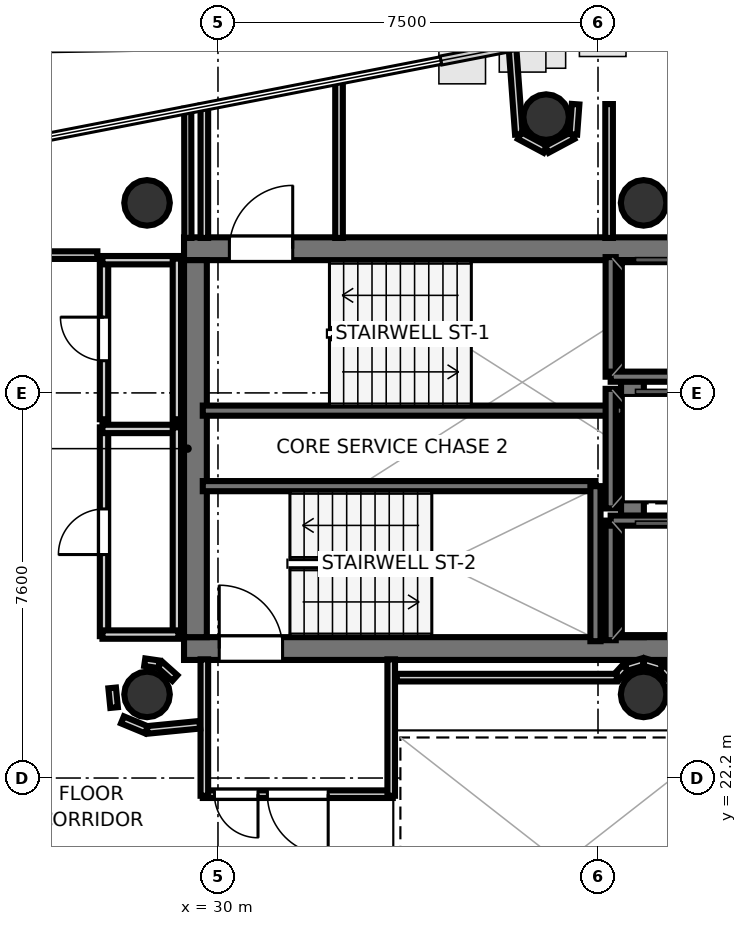
"""IFC4 building model, lengths in metres.
Left out: names, types, materials, properties, quantities, classifications, styles, units other than length and angle.
Written with IfcOpenShell. Run it as: python <this file> out.ifc"""

import sys

from ifc_helpers import new_model, si_unit, direction, frame, frame_2d, origin, origin_2d, place, context, subcontext, project, spatial, rectangle, hollow_circle, extrude, element, fill, save


model = new_model("IFC4")
c1 = context("Model", 3, precision=1e-05, world=origin(), true_north=direction((0.0, 1.0)))
c2 = subcontext(c1, "Body", "Model", "MODEL_VIEW")
j1 = project(units=[si_unit("LENGTHUNIT", "METRE"), si_unit("PLANEANGLEUNIT", "RADIAN")], contexts=[c1])
p1 = place(None, origin())
s1 = spatial("IfcSite", under=j1, at=p1, CompositionType="ELEMENT")
p2 = place(p1, origin())
s2 = spatial("IfcBuilding", under=s1, at=p2, CompositionType="ELEMENT")
p3 = place(p2, frame((0.0, 0.0, 299.1)))
s3 = spatial("IfcBuildingStorey", under=s2, at=p3, CompositionType="ELEMENT", Elevation=299.1)
p4 = place(p3, frame((29.33, 32.645, 0.0), z_axis=(0.0, 0.0, 1.0), x_axis=(1.0, 0.0, 0.0)))
e1 = element("IfcWall", 1, at=p4, inside=s3, PredefinedType="SHEAR", context=c2, shape_type="SweptSolid", body=[
    extrude(rectangle(XDim=10.52, YDim=0.45, at=frame_2d((5.26, 0.0))), origin(), (0.0, 0.0, 1.0), 3.52),
])
p5 = place(p4, frame((0.895, 0.0, 0.0)))
e2 = element("IfcOpeningElement", 2, at=p5, cuts=e1, PredefinedType="OPENING", context=c2, shape_type="SweptSolid", body=[
    extrude(rectangle(XDim=1.25, YDim=2.15, at=frame_2d((0.625, 1.075))), frame((0.0, 0.235, 0.0), z_axis=(0.0, -1.0, 0.0), x_axis=(1.0, 0.0, 0.0)), (0.0, 0.0, 1.0), 0.47),
])
p6 = place(p3, frame((29.33, 24.755, 0.0), z_axis=(0.0, 0.0, 1.0), x_axis=(1.0, 0.0, 0.0)))
e3 = element("IfcWall", 3, at=p6, inside=s3, PredefinedType="SHEAR", context=c2, shape_type="SweptSolid", body=[
    extrude(rectangle(XDim=10.52, YDim=0.45, at=frame_2d((5.26, 0.0))), origin(), (0.0, 0.0, 1.0), 3.52),
])
p7 = place(p6, frame((0.695, 0.0, 0.0)))
e4 = element("IfcOpeningElement", 4, at=p7, cuts=e3, PredefinedType="OPENING", context=c2, shape_type="SweptSolid", body=[
    extrude(rectangle(XDim=1.25, YDim=2.15, at=frame_2d((0.625, 1.075))), frame((0.0, 0.235, 0.0), z_axis=(0.0, -1.0, 0.0), x_axis=(1.0, 0.0, 0.0)), (0.0, 0.0, 1.0), 0.47),
])
for number, where, z_axis, x_axis in (
    (5, (29.555, 24.98, 0.0), (0.0, 0.0, 1.0), (0.0, 1.0, 0.0)),
    (6, (38.18, 24.98, 0.0), (0.0, 0.0, 1.0), (0.0, 1.0, 0.0)),
):
    element("IfcWall", number, at=place(p3, frame(where, z_axis=z_axis, x_axis=x_axis)), inside=s3, PredefinedType="SHEAR", context=c2, shape_type="SweptSolid", body=[
        extrude(rectangle(XDim=7.44, YDim=0.45, at=frame_2d((3.72, 0.0))), origin(), (0.0, 0.0, 1.0), 3.52),
    ])
for number, where, z_axis, x_axis in (
    (7, (28.6, 33.55, 0.0), (0.0, 0.0, 1.0), (1.0, 0.0, 0.0)),
    (8, (28.6, 23.85, 0.0), (0.0, 0.0, 1.0), (1.0, 0.0, 0.0)),
    (9, (38.4, 33.55, 0.0), (0.0, 0.0, 1.0), (1.0, 0.0, 0.0)),
    (10, (38.4, 23.85, 0.0), (0.0, 0.0, 1.0), (1.0, 0.0, 0.0)),
    (11, (36.476, 35.243, 0.0), (0.0, 0.0, 1.0), (1.0, 0.0, 0.0)),
):
    element("IfcColumn", number, at=place(p3, frame(where, z_axis=z_axis, x_axis=x_axis)), inside=s3, PredefinedType="COLUMN", context=c2, shape_type="SweptSolid", body=[
        extrude(hollow_circle(Radius=0.45, WallThickness=0.025, at=origin_2d()), origin(), (0.0, 0.0, 1.0), 3.7),
    ])
p8 = place(p3, frame((29.7, 29.45, 0.0), z_axis=(0.0, 0.0, 1.0), x_axis=(1.0, 0.0, 0.0)))
e12 = element("IfcWall", 12, at=p8, inside=s3, PredefinedType="SOLIDWALL", context=c2, shape_type="SweptSolid", body=[
    extrude(rectangle(XDim=8.3, YDim=0.2, at=frame_2d((4.15, 0.0))), origin(), (0.0, 0.0, 1.0), 3.52),
])
p9 = place(p3, frame((29.7, 27.96, 0.0), z_axis=(0.0, 0.0, 1.0), x_axis=(1.0, 0.0, 0.0)))
e13 = element("IfcWall", 13, at=p9, inside=s3, PredefinedType="SOLIDWALL", context=c2, shape_type="SweptSolid", body=[
    extrude(rectangle(XDim=7.75, YDim=0.2, at=frame_2d((3.875, 0.0))), origin(), (0.0, 0.0, 1.0), 3.52),
])
p10 = place(p3, frame((37.45, 24.9, 0.0), z_axis=(0.0, 0.0, 1.0), x_axis=(0.0, 1.0, 0.0)))
e14 = element("IfcWall", 14, at=p10, inside=s3, PredefinedType="SOLIDWALL", context=c2, shape_type="SweptSolid", body=[
    extrude(rectangle(XDim=3.06, YDim=0.2, at=frame_2d((1.53, 0.0))), origin(), (0.0, 0.0, 1.0), 3.52),
])
p11 = place(p3, frame((37.75, 30.12, 0.0), z_axis=(0.0, 0.0, 1.0), x_axis=(0.0, 1.0, 0.0)))
e15 = element("IfcWall", 15, at=p11, inside=s3, PredefinedType="SOLIDWALL", context=c2, shape_type="SweptSolid", body=[
    extrude(rectangle(XDim=2.36, YDim=0.2, at=frame_2d((1.18, 0.0))), origin(), (0.0, 0.0, 1.0), 3.52),
])
p12 = place(p3, frame((37.75, 30.12, 0.0), z_axis=(0.0, 0.0, 1.0), x_axis=(1.0, 0.0, 0.0)))
e16 = element("IfcWall", 16, at=p12, inside=s3, PredefinedType="SOLIDWALL", context=c2, shape_type="SweptSolid", body=[
    extrude(rectangle(XDim=2.1, YDim=0.2, at=frame_2d((1.05, 0.0))), origin(), (0.0, 0.0, 1.0), 3.52),
])
p13 = place(p3, frame((37.75, 24.92, 0.0), z_axis=(0.0, 0.0, 1.0), x_axis=(0.0, 1.0, 0.0)))
e17 = element("IfcWall", 17, at=p13, inside=s3, PredefinedType="SOLIDWALL", context=c2, shape_type="SweptSolid", body=[
    extrude(rectangle(XDim=2.36, YDim=0.2, at=frame_2d((1.18, 0.0))), origin(), (0.0, 0.0, 1.0), 3.52),
])
p14 = place(p3, frame((37.75, 27.28, 0.0), z_axis=(0.0, 0.0, 1.0), x_axis=(1.0, 0.0, 0.0)))
e18 = element("IfcWall", 18, at=p14, inside=s3, PredefinedType="SOLIDWALL", context=c2, shape_type="SweptSolid", body=[
    extrude(rectangle(XDim=2.1, YDim=0.2, at=frame_2d((1.05, 0.0))), origin(), (0.0, 0.0, 1.0), 3.52),
])
p15 = place(p3, frame((37.75, 27.52, 0.0), z_axis=(0.0, 0.0, 1.0), x_axis=(0.0, 1.0, 0.0)))
e19 = element("IfcWall", 19, at=p15, inside=s3, PredefinedType="SOLIDWALL", context=c2, shape_type="SweptSolid", body=[
    extrude(rectangle(XDim=2.36, YDim=0.2, at=frame_2d((1.18, 0.0))), origin(), (0.0, 0.0, 1.0), 3.52),
])
p16 = place(p3, frame((29.731, 32.858, 0.0), z_axis=(0.0, 0.0, 1.0), x_axis=(0.0, 1.0, 0.0)))
e20 = element("IfcWall", 20, at=p16, inside=s3, PredefinedType="PARTITIONING", context=c2, shape_type="SweptSolid", body=[
    extrude(rectangle(XDim=2.613, YDim=0.15, at=frame_2d((1.307, 0.0))), origin(), (0.0, 0.0, 1.0), 2.84),
])
p17 = place(p3, frame((32.389, 35.988, 0.0), z_axis=(0.0, 0.0, 1.0), x_axis=(0.0, -1.0, 0.0)))
e21 = element("IfcWall", 21, at=p17, inside=s3, PredefinedType="PARTITIONING", context=c2, shape_type="SweptSolid", body=[
    extrude(rectangle(XDim=3.13, YDim=0.15, at=frame_2d((1.565, 0.0))), origin(), (0.0, 0.0, 1.0), 2.84),
])
p18 = place(p3, frame((33.45, 21.881, 0.0), z_axis=(0.0, 0.0, 1.0), x_axis=(-1.0, 0.0, 0.0)))
e22 = element("IfcWall", 22, at=p18, inside=s3, PredefinedType="PARTITIONING", context=c2, shape_type="SweptSolid", body=[
    extrude(rectangle(XDim=3.75, YDim=0.15, at=frame_2d((1.875, 0.0))), origin(), (0.0, 0.0, 1.0), 2.84),
])
p19 = place(p18, frame((1.275, 0.0, 0.0)))
e23 = element("IfcOpeningElement", 23, at=p19, cuts=e22, PredefinedType="OPENING", context=c2, shape_type="SweptSolid", body=[
    extrude(rectangle(XDim=1.2, YDim=2.15, at=frame_2d((0.6, 1.075))), frame((0.0, 0.085, 0.0), z_axis=(0.0, -1.0, 0.0), x_axis=(1.0, 0.0, 0.0)), (0.0, 0.0, 1.0), 0.17),
])
p20 = place(p18, frame((2.66, 0.0, 0.0)))
e24 = element("IfcOpeningElement", 24, at=p20, cuts=e22, PredefinedType="OPENING", context=c2, shape_type="SweptSolid", body=[
    extrude(rectangle(XDim=0.86, YDim=2.05, at=frame_2d((0.43, 1.025))), frame((0.0, 0.085, 0.0), z_axis=(0.0, -1.0, 0.0), x_axis=(1.0, 0.0, 0.0)), (0.0, 0.0, 1.0), 0.17),
])
for number, where, z_axis, x_axis in (
    (25, (29.731, 21.85, 0.0), (0.0, 0.0, 1.0), (0.0, 1.0, 0.0)),
    (26, (33.419, 24.542, 0.0), (0.0, 0.0, 1.0), (0.0, -1.0, 0.0)),
):
    element("IfcWall", number, at=place(p3, frame(where, z_axis=z_axis, x_axis=x_axis)), inside=s3, PredefinedType="PARTITIONING", context=c2, shape_type="SweptSolid", body=[
        extrude(rectangle(XDim=2.692, YDim=0.15, at=frame_2d((1.346, 0.0))), origin(), (0.0, 0.0, 1.0), 2.84),
    ])
p21 = place(p3, frame((27.751, 25.0, 0.0), z_axis=(0.0, 0.0, 1.0), x_axis=(0.0, 1.0, 0.0)))
e27 = element("IfcWall", 27, at=p21, inside=s3, PredefinedType="PLUMBINGWALL", context=c2, shape_type="SweptSolid", body=[
    extrude(rectangle(XDim=4.12, YDim=0.165, at=frame_2d((2.06, 0.0))), origin(), (0.0, 0.0, 1.0), 2.84),
])
p22 = place(p21, frame((1.61, 0.0, 0.0)))
e28 = element("IfcOpeningElement", 28, at=p22, cuts=e27, PredefinedType="OPENING", context=c2, shape_type="SweptSolid", body=[
    extrude(rectangle(XDim=0.9, YDim=2.1, at=frame_2d((0.45, 1.05))), frame((0.0, 0.093, 0.0), z_axis=(0.0, -1.0, 0.0), x_axis=(1.0, 0.0, 0.0)), (0.0, 0.0, 1.0), 0.185),
])
p23 = place(p3, frame((27.72, 29.089, 0.0), z_axis=(0.0, 0.0, 1.0), x_axis=(1.0, 0.0, 0.0)))
e29 = element("IfcWall", 29, at=p23, inside=s3, PredefinedType="PLUMBINGWALL", context=c2, shape_type="SweptSolid", body=[
    extrude(rectangle(XDim=1.5, YDim=0.165, at=frame_2d((0.75, 0.0))), origin(), (0.0, 0.0, 1.0), 2.84),
])
p24 = place(p3, frame((29.189, 29.12, 0.0), z_axis=(0.0, 0.0, 1.0), x_axis=(0.0, -1.0, 0.0)))
e30 = element("IfcWall", 30, at=p24, inside=s3, PredefinedType="PLUMBINGWALL", context=c2, shape_type="SweptSolid", body=[
    extrude(rectangle(XDim=4.12, YDim=0.165, at=frame_2d((2.06, 0.0))), origin(), (0.0, 0.0, 1.0), 2.84),
])
p25 = place(p3, frame((29.22, 25.031, 0.0), z_axis=(0.0, 0.0, 1.0), x_axis=(-1.0, 0.0, 0.0)))
e31 = element("IfcWall", 31, at=p25, inside=s3, PredefinedType="PLUMBINGWALL", context=c2, shape_type="SweptSolid", body=[
    extrude(rectangle(XDim=1.5, YDim=0.165, at=frame_2d((0.75, 0.0))), origin(), (0.0, 0.0, 1.0), 2.84),
])
p26 = place(p3, frame((27.751, 29.28, 0.0), z_axis=(0.0, 0.0, 1.0), x_axis=(0.0, 1.0, 0.0)))
e32 = element("IfcWall", 32, at=p26, inside=s3, PredefinedType="PLUMBINGWALL", context=c2, shape_type="SweptSolid", body=[
    extrude(rectangle(XDim=3.17, YDim=0.165, at=frame_2d((1.585, 0.0))), origin(), (0.0, 0.0, 1.0), 2.84),
])
p27 = place(p26, frame((1.155, 0.0, 0.0)))
e33 = element("IfcOpeningElement", 33, at=p27, cuts=e32, PredefinedType="OPENING", context=c2, shape_type="SweptSolid", body=[
    extrude(rectangle(XDim=0.86, YDim=2.05, at=frame_2d((0.43, 1.025))), frame((0.0, 0.093, 0.0), z_axis=(0.0, -1.0, 0.0), x_axis=(1.0, 0.0, 0.0)), (0.0, 0.0, 1.0), 0.185),
])
p28 = place(p3, frame((27.72, 32.419, 0.0), z_axis=(0.0, 0.0, 1.0), x_axis=(1.0, 0.0, 0.0)))
e34 = element("IfcWall", 34, at=p28, inside=s3, PredefinedType="PLUMBINGWALL", context=c2, shape_type="SweptSolid", body=[
    extrude(rectangle(XDim=1.5, YDim=0.165, at=frame_2d((0.75, 0.0))), origin(), (0.0, 0.0, 1.0), 2.84),
])
p29 = place(p3, frame((29.189, 32.45, 0.0), z_axis=(0.0, 0.0, 1.0), x_axis=(0.0, -1.0, 0.0)))
e35 = element("IfcWall", 35, at=p29, inside=s3, PredefinedType="PLUMBINGWALL", context=c2, shape_type="SweptSolid", body=[
    extrude(rectangle(XDim=3.17, YDim=0.165, at=frame_2d((1.585, 0.0))), origin(), (0.0, 0.0, 1.0), 2.84),
])
p30 = place(p3, frame((38.951, 24.171, 0.0), z_axis=(0.0, 0.0, 1.0), x_axis=(-0.674186852077, 0.738560822469, 0.0)))
e36 = element("IfcWall", 36, at=p30, inside=s3, PredefinedType="PARTITIONING", context=c2, shape_type="SweptSolid", body=[
    extrude(rectangle(XDim=0.281, YDim=0.15, at=frame_2d((0.14, 0.0))), origin(), (0.0, 0.0, 1.0), 2.84),
])
p31 = place(p3, frame((38.748, 24.387, 0.0), z_axis=(0.0, 0.0, 1.0), x_axis=(-0.956948991291, 0.290256142171, 0.0)))
e37 = element("IfcWall", 37, at=p31, inside=s3, PredefinedType="PARTITIONING", context=c2, shape_type="SweptSolid", body=[
    extrude(rectangle(XDim=0.354, YDim=0.15, at=frame_2d((0.177, 0.0))), origin(), (0.0, 0.0, 1.0), 2.84),
])
p32 = place(p3, frame((38.391, 24.49, 0.0), z_axis=(0.0, 0.0, 1.0), x_axis=(-0.957007018611, -0.290064762301, 0.0)))
e38 = element("IfcWall", 38, at=p32, inside=s3, PredefinedType="PARTITIONING", context=c2, shape_type="SweptSolid", body=[
    extrude(rectangle(XDim=0.354, YDim=0.15, at=frame_2d((0.177, 0.0))), origin(), (0.0, 0.0, 1.0), 2.84),
])
p33 = place(p3, frame((38.038, 24.378, 0.0), z_axis=(0.0, 0.0, 1.0), x_axis=(-0.673658387955, -0.739042878551, 0.0)))
e39 = element("IfcWall", 39, at=p33, inside=s3, PredefinedType="PARTITIONING", context=c2, shape_type="SweptSolid", body=[
    extrude(rectangle(XDim=0.246, YDim=0.15, at=frame_2d((0.123, 0.0))), origin(), (0.0, 0.0, 1.0), 2.84),
])
p34 = place(p3, frame((37.872, 24.181, 0.0), z_axis=(0.0, 0.0, 1.0), x_axis=(-1.0, 0.0, 0.0)))
e40 = element("IfcWall", 40, at=p34, inside=s3, PredefinedType="PARTITIONING", context=c2, shape_type="SweptSolid", body=[
    extrude(rectangle(XDim=4.342, YDim=0.15, at=frame_2d((2.171, 0.0))), origin(), (0.0, 0.0, 1.0), 2.84),
])
p35 = place(p3, frame((29.149, 24.173, 0.0), z_axis=(0.0, 0.0, 1.0), x_axis=(-0.745225165416, 0.666812906917, 0.0)))
e41 = element("IfcWall", 41, at=p35, inside=s3, PredefinedType="PARTITIONING", context=c2, shape_type="SweptSolid", body=[
    extrude(rectangle(XDim=0.396, YDim=0.15, at=frame_2d((0.198, 0.0))), origin(), (0.0, 0.0, 1.0), 2.84),
])
p36 = place(p3, frame((28.838, 24.444, 0.0), z_axis=(0.0, 0.0, 1.0), x_axis=(-0.989449148305, 0.144880581578, 0.0)))
e42 = element("IfcWall", 42, at=p36, inside=s3, PredefinedType="PARTITIONING", context=c2, shape_type="SweptSolid", body=[
    extrude(rectangle(XDim=0.286, YDim=0.15, at=frame_2d((0.143, 0.0))), origin(), (0.0, 0.0, 1.0), 2.84),
])
p37 = place(p3, frame((35.809, 36.653, 0.0), z_axis=(0.0, 0.0, 1.0), x_axis=(0.073400577202, -0.997302539487, 0.0)))
e43 = element("IfcWall", 43, at=p37, inside=s3, PredefinedType="PARTITIONING", context=c2, shape_type="SweptSolid", body=[
    extrude(rectangle(XDim=1.756, YDim=0.15, at=frame_2d((0.878, 0.0))), origin(), (0.0, 0.0, 1.0), 2.84),
])
for number, where, z_axis, x_axis in (
    (44, (35.954, 34.877, 0.0), (0.0, 0.0, 1.0), (0.882, -0.471, 0.0)),
    (45, (36.49, 34.606, 0.0), (0.0, 0.0, 1.0), (0.882, 0.471, 0.0)),
):
    element("IfcWall", number, at=place(p3, frame(where, z_axis=z_axis, x_axis=x_axis)), inside=s3, PredefinedType="PARTITIONING", context=c2, shape_type="SweptSolid", body=[
        extrude(rectangle(XDim=0.575, YDim=0.15, at=frame_2d((0.288, 0.0))), origin(), (0.0, 0.0, 1.0), 2.84),
    ])
p38 = place(p3, frame((37.014, 34.902, 0.0), z_axis=(0.0, 0.0, 1.0), x_axis=(0.073134230676, 0.997322106595, 0.0)))
e46 = element("IfcWall", 46, at=p38, inside=s3, PredefinedType="PARTITIONING", context=c2, shape_type="SweptSolid", body=[
    extrude(rectangle(XDim=0.598, YDim=0.15, at=frame_2d((0.299, 0.0))), origin(), (0.0, 0.0, 1.0), 2.84),
])
p39 = place(p3, frame((37.719, 35.5, 0.0), z_axis=(0.0, 0.0, 1.0), x_axis=(0.0, -1.0, 0.0)))
e47 = element("IfcWall", 47, at=p39, inside=s3, PredefinedType="PARTITIONING", context=c2, shape_type="SweptSolid", body=[
    extrude(rectangle(XDim=2.642, YDim=0.15, at=frame_2d((1.321, 0.0))), origin(), (0.0, 0.0, 1.0), 2.84),
])
p40 = place(p3, frame((25.65, 32.519, 0.0), z_axis=(0.0, 0.0, 1.0), x_axis=(1.0, 0.0, 0.0)))
e48 = element("IfcWall", 48, at=p40, inside=s3, PredefinedType="PARTITIONING", context=c2, shape_type="SweptSolid", body=[
    extrude(rectangle(XDim=1.97, YDim=0.15, at=frame_2d((0.985, 0.0))), origin(), (0.0, 0.0, 1.0), 2.84),
])
p41 = place(p3, frame((27.912, 23.978, 0.0), z_axis=(0.0, 0.0, 1.0), x_axis=(0.097888269922, -0.995197410875, 0.0)))
e49 = element("IfcWall", 49, at=p41, inside=s3, PredefinedType="PARTITIONING", context=c2, shape_type="SweptSolid", body=[
    extrude(rectangle(XDim=0.389, YDim=0.15, at=frame_2d((0.195, 0.0))), origin(), (0.0, 0.0, 1.0), 2.84),
])
p42 = place(p3, frame((28.115, 23.348, 0.0), z_axis=(0.0, 0.0, 1.0), x_axis=(0.923807847969, -0.382856448334, 0.0)))
e50 = element("IfcWall", 50, at=p42, inside=s3, PredefinedType="PARTITIONING", context=c2, shape_type="SweptSolid", body=[
    extrude(rectangle(XDim=0.513, YDim=0.15, at=frame_2d((0.256, 0.0))), origin(), (0.0, 0.0, 1.0), 2.84),
])
p43 = place(p3, frame((28.603, 23.149, 0.0), z_axis=(0.0, 0.0, 1.0), x_axis=(0.995179827095, 0.098066873836, 0.0)))
e51 = element("IfcWall", 51, at=p43, inside=s3, PredefinedType="PARTITIONING", context=c2, shape_type="SweptSolid", body=[
    extrude(rectangle(XDim=1.043, YDim=0.15, at=frame_2d((0.521, 0.0))), origin(), (0.0, 0.0, 1.0), 2.84),
])
p44 = place(p3, frame((55.938, 37.275, 0.0), z_axis=(0.0, 0.0, 1.0), x_axis=(-0.504337097155, -0.863506857201, 0.0)))
e52 = element("IfcWall", 52, at=p44, inside=s3, PredefinedType="PARTITIONING", context=c2, shape_type="SweptSolid", body=[
    extrude(rectangle(XDim=35.169, YDim=0.105, at=frame_2d((17.585, 0.0))), origin(), (0.0, 0.0, 1.0), 2.84),
])
p45 = place(p3, frame((29.403, 35.407, 0.0), z_axis=(0.0, 0.0, 1.0), x_axis=(0.001532418467, -0.999998825846, 0.0)))
e53 = element("IfcWall", 53, at=p45, inside=s3, PredefinedType="PARTITIONING", context=c2, shape_type="SweptSolid", body=[
    extrude(rectangle(XDim=2.549, YDim=0.14, at=frame_2d((1.274, 0.0))), origin(), (0.0, 0.0, 1.0), 2.84),
])
p46 = place(p5, origin())
e54 = element("IfcDoor", 54, at=p46, inside=s3, OperationType="SINGLE_SWING_RIGHT", PredefinedType="DOOR", context=c2, shape_type="SweptSolid", body=[
    extrude(rectangle(XDim=1.25, YDim=2.15, at=frame_2d((0.625, 1.075))), frame((0.0, 0.025, 0.0), z_axis=(0.0, -1.0, 0.0), x_axis=(1.0, 0.0, 0.0)), (0.0, 0.0, 1.0), 0.05),
])
fill(e2, e54)
p47 = place(p7, origin())
e55 = element("IfcDoor", 55, at=p47, inside=s3, OperationType="SINGLE_SWING_LEFT", PredefinedType="DOOR", context=c2, shape_type="SweptSolid", body=[
    extrude(rectangle(XDim=1.25, YDim=2.15, at=frame_2d((0.625, 1.075))), frame((0.0, 0.025, 0.0), z_axis=(0.0, -1.0, 0.0), x_axis=(1.0, 0.0, 0.0)), (0.0, 0.0, 1.0), 0.05),
])
fill(e4, e55)
p48 = place(p19, origin())
e56 = element("IfcDoor", 56, at=p48, inside=s3, OperationType="SINGLE_SWING_LEFT", PredefinedType="DOOR", context=c2, shape_type="SweptSolid", body=[
    extrude(rectangle(XDim=1.2, YDim=2.15, at=frame_2d((0.6, 1.075))), frame((0.0, 0.025, 0.0), z_axis=(0.0, -1.0, 0.0), x_axis=(1.0, 0.0, 0.0)), (0.0, 0.0, 1.0), 0.05),
])
fill(e23, e56)
p49 = place(p22, origin())
e57 = element("IfcDoor", 57, at=p49, inside=s3, OperationType="SINGLE_SWING_LEFT", PredefinedType="DOOR", context=c2, shape_type="SweptSolid", body=[
    extrude(rectangle(XDim=0.9, YDim=2.1, at=frame_2d((0.45, 1.05))), frame((0.0, 0.025, 0.0), z_axis=(0.0, -1.0, 0.0), x_axis=(1.0, 0.0, 0.0)), (0.0, 0.0, 1.0), 0.05),
])
fill(e28, e57)
p50 = place(p27, origin())
e58 = element("IfcDoor", 58, at=p50, inside=s3, OperationType="SINGLE_SWING_RIGHT", PredefinedType="DOOR", context=c2, shape_type="SweptSolid", body=[
    extrude(rectangle(XDim=0.86, YDim=2.05, at=frame_2d((0.43, 1.025))), frame((0.0, 0.025, 0.0), z_axis=(0.0, -1.0, 0.0), x_axis=(1.0, 0.0, 0.0)), (0.0, 0.0, 1.0), 0.05),
])
fill(e33, e58)
p51 = place(p20, origin())
e59 = element("IfcDoor", 59, at=p51, inside=s3, OperationType="SINGLE_SWING_LEFT", PredefinedType="DOOR", context=c2, shape_type="SweptSolid", body=[
    extrude(rectangle(XDim=0.86, YDim=2.05, at=frame_2d((0.43, 1.025))), frame((0.0, 0.025, 0.0), z_axis=(0.0, -1.0, 0.0), x_axis=(1.0, 0.0, 0.0)), (0.0, 0.0, 1.0), 0.05),
])
fill(e24, e59)
save(model, sys.argv[1])
